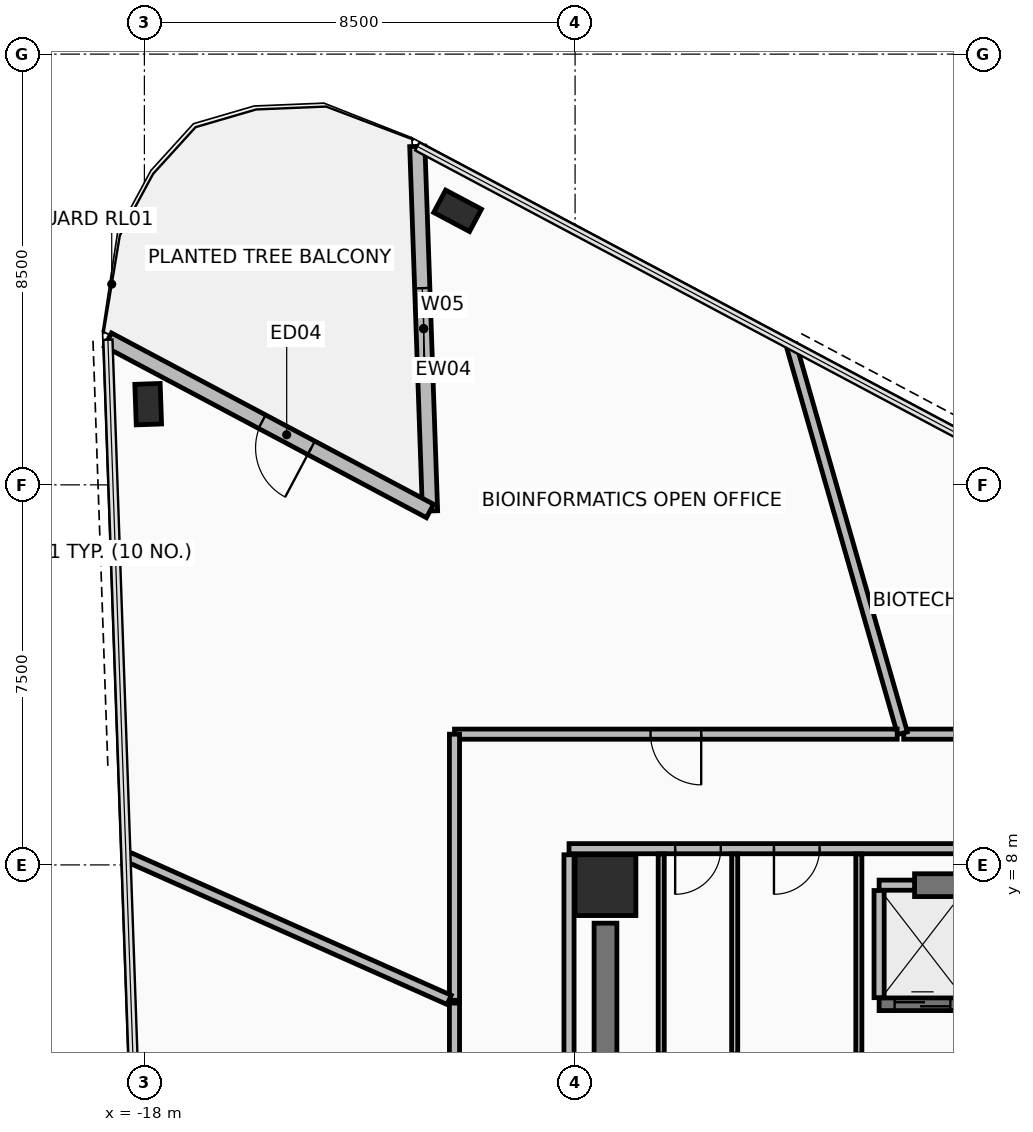
"""IFC4 building model, lengths in metres.
Left out: names, types, materials, properties, quantities, classifications, styles, units other than length and angle.
Written with IfcOpenShell. Run it as: python <this file> out.ifc"""

import sys

from ifc_helpers import new_model, si_unit, direction, frame, frame_2d, origin, origin_2d, place, context, subcontext, project, spatial, rectangle, hollow_rectangle, extrude, element, fill, save


model = new_model("IFC4")
c1 = context("Model", 3, precision=1e-05, world=origin(), true_north=direction((0.0, 1.0)))
c2 = subcontext(c1, "Body", "Model", "MODEL_VIEW")
j1 = project(units=[si_unit("LENGTHUNIT", "METRE"), si_unit("PLANEANGLEUNIT", "RADIAN")], contexts=[c1])
p1 = place(None, origin())
s1 = spatial("IfcSite", under=j1, at=p1, CompositionType="ELEMENT")
p2 = place(p1, origin())
s2 = spatial("IfcBuilding", under=s1, at=p2, CompositionType="ELEMENT")
p3 = place(p2, frame((0.0, 0.0, 142.4)))
s3 = spatial("IfcBuildingStorey", under=s2, at=p3, CompositionType="ELEMENT", Elevation=142.4)
p4 = place(p3, frame((-8.9, 7.6, 0.0), z_axis=(0.0, 0.0, 1.0), x_axis=(1.0, 0.0, 0.0)))
e1 = element("IfcColumn", 1, at=p4, inside=s3, PredefinedType="COLUMN", context=c2, shape_type="SweptSolid", body=[
    extrude(rectangle(XDim=1.2, YDim=1.2, at=origin_2d()), origin(), (0.0, 0.0, 1.0), 3.6),
])
for number, where, z_axis, x_axis in (
    (2, (-17.925, 17.092, 0.0), (0.0, 0.0, 1.0), (-0.035, 0.999, 0.0)),
    (3, (-11.819, 20.908, 0.0), (0.0, 0.0, 1.0), (-0.883, 0.469, 0.0)),
):
    element("IfcColumn", number, at=place(p3, frame(where, z_axis=z_axis, x_axis=x_axis)), inside=s3, PredefinedType="COLUMN", context=c2, shape_type="SweptSolid", body=[
        extrude(hollow_rectangle(XDim=0.5, YDim=0.8, WallThickness=0.04, at=origin_2d()), origin(), (0.0, 0.0, 1.0), 3.6),
    ])
p5 = place(p3, frame((-12.614, 22.18, 0.0), z_axis=(0.0, 0.0, 1.0), x_axis=(0.034925918675, -0.999389903994, 0.0)))
e4 = element("IfcWall", 4, at=p5, inside=s3, PredefinedType="STANDARD", context=c2, shape_type="SweptSolid", body=[
    extrude(rectangle(XDim=7.2, YDim=0.3, at=frame_2d((3.6, 0.0))), origin(), (0.0, 0.0, 1.0), 2.705),
])
p6 = place(p5, frame((2.8, 0.0, 0.325)))
e5 = element("IfcOpeningElement", 5, at=p6, cuts=e4, PredefinedType="OPENING", context=c2, shape_type="SweptSolid", body=[
    extrude(rectangle(XDim=1.6, YDim=2.2, at=frame_2d((0.8, 1.1))), frame((0.0, 0.16, 0.0), z_axis=(0.0, -1.0, 0.0), x_axis=(1.0, 0.0, 0.0)), (0.0, 0.0, 1.0), 0.32),
])
p7 = place(p3, frame((-12.363, 14.984, 0.0), z_axis=(0.0, 0.0, 1.0), x_axis=(-0.882950149473, 0.469466754463, 0.0)))
e6 = element("IfcWall", 6, at=p7, inside=s3, PredefinedType="STANDARD", context=c2, shape_type="SweptSolid", body=[
    extrude(rectangle(XDim=7.2, YDim=0.3, at=frame_2d((3.6, 0.0))), origin(), (0.0, 0.0, 1.0), 2.705),
])
p8 = place(p7, frame((2.654, 0.0, 0.0)))
e7 = element("IfcOpeningElement", 7, at=p8, cuts=e6, PredefinedType="OPENING", context=c2, shape_type="SweptSolid", body=[
    extrude(rectangle(XDim=1.1, YDim=2.2, at=frame_2d((0.55, 1.1))), frame((0.0, 0.16, 0.0), z_axis=(0.0, -1.0, 0.0), x_axis=(1.0, 0.0, 0.0)), (0.0, 0.0, 1.0), 0.32),
])
p9 = place(p3, frame((-2.8, 7.6, 0.0), z_axis=(0.0, 0.0, 1.0), x_axis=(1.0, 0.0, 0.0)))
e8 = element("IfcWall", 8, at=p9, inside=s3, PredefinedType="SHEAR", context=c2, shape_type="SweptSolid", body=[
    extrude(rectangle(XDim=5.38, YDim=0.45, at=frame_2d((2.69, 0.0))), origin(), (0.0, 0.0, 1.0), 3.41),
])
p10 = place(p3, frame((-8.9, -3.85, 0.0), z_axis=(0.0, 0.0, 1.0), x_axis=(0.0, 1.0, 0.0)))
e9 = element("IfcWall", 9, at=p10, inside=s3, PredefinedType="SHEAR", context=c2, shape_type="SweptSolid", body=[
    extrude(rectangle(XDim=10.7, YDim=0.45, at=frame_2d((5.35, 0.0))), origin(), (0.0, 0.0, 1.0), 3.41),
])
p11 = place(p3, frame((9.62, 8.32, 0.0), z_axis=(0.0, 0.0, 1.0), x_axis=(-1.0, 0.0, 0.0)))
e10 = element("IfcWall", 10, at=p11, inside=s3, PredefinedType="PARTITIONING", context=c2, shape_type="SweptSolid", body=[
    extrude(rectangle(XDim=19.24, YDim=0.2, at=frame_2d((9.62, 0.0))), origin(), (0.0, 0.0, 1.0), 2.755),
])
p12 = place(p11, frame((16.245, 0.0, 0.0)))
e11 = element("IfcOpeningElement", 11, at=p12, cuts=e10, PredefinedType="OPENING", context=c2, shape_type="SweptSolid", body=[
    extrude(rectangle(XDim=0.9, YDim=2.1, at=frame_2d((0.45, 1.05))), frame((0.0, 0.11, 0.0), z_axis=(0.0, -1.0, 0.0), x_axis=(1.0, 0.0, 0.0)), (0.0, 0.0, 1.0), 0.22),
])
p13 = place(p11, frame((14.295, 0.0, 0.0)))
e12 = element("IfcOpeningElement", 12, at=p13, cuts=e10, PredefinedType="OPENING", context=c2, shape_type="SweptSolid", body=[
    extrude(rectangle(XDim=0.9, YDim=2.1, at=frame_2d((0.45, 1.05))), frame((0.0, 0.11, 0.0), z_axis=(0.0, -1.0, 0.0), x_axis=(1.0, 0.0, 0.0)), (0.0, 0.0, 1.0), 0.22),
])
p14 = place(p3, frame((-9.62, 8.2, 0.0), z_axis=(0.0, 0.0, 1.0), x_axis=(0.0, -1.0, 0.0)))
e13 = element("IfcWall", 13, at=p14, inside=s3, PredefinedType="PARTITIONING", context=c2, shape_type="SweptSolid", body=[
    extrude(rectangle(XDim=16.4, YDim=0.2, at=frame_2d((8.2, 0.0))), origin(), (0.0, 0.0, 1.0), 2.855),
])
p15 = place(p14, frame((12.65, 0.0, 0.0)))
e14 = element("IfcOpeningElement", 14, at=p15, cuts=e13, PredefinedType="OPENING", context=c2, shape_type="SweptSolid", body=[
    extrude(rectangle(XDim=1.1, YDim=2.15, at=frame_2d((0.55, 1.075))), frame((0.0, 0.11, 0.0), z_axis=(0.0, -1.0, 0.0), x_axis=(1.0, 0.0, 0.0)), (0.0, 0.0, 1.0), 0.22),
])
p16 = place(p3, frame((-3.5, 5.25, 0.0), z_axis=(0.0, 0.0, 1.0), x_axis=(1.0, 0.0, 0.0)))
e15 = element("IfcWall", 15, at=p16, inside=s3, PredefinedType="SHEAR", context=c2, shape_type="SweptSolid", body=[
    extrude(rectangle(XDim=1.712, YDim=0.25, at=frame_2d((0.856, 0.0))), origin(), (0.0, 0.0, 1.0), 3.41),
])
p17 = place(p16, frame((0.306, 0.0, 0.0)))
e16 = element("IfcOpeningElement", 16, at=p17, cuts=e15, PredefinedType="OPENING", context=c2, shape_type="SweptSolid", body=[
    extrude(rectangle(XDim=1.1, YDim=2.2, at=frame_2d((0.55, 1.1))), frame((0.0, 0.135, 0.0), z_axis=(0.0, -1.0, 0.0), x_axis=(1.0, 0.0, 0.0)), (0.0, 0.0, 1.0), 0.27),
])
p18 = place(p3, frame((-3.5, 7.6, 0.0), z_axis=(0.0, 0.0, 1.0), x_axis=(1.0, 0.0, 0.0)))
e17 = element("IfcWall", 17, at=p18, inside=s3, PredefinedType="PARTITIONING", context=c2, shape_type="SweptSolid", body=[
    extrude(rectangle(XDim=0.7, YDim=0.2, at=frame_2d((0.35, 0.0))), origin(), (0.0, 0.0, 1.0), 2.605),
])
p19 = place(p3, frame((-3.5, 5.38, 0.0), z_axis=(0.0, 0.0, 1.0), x_axis=(0.0, 1.0, 0.0)))
e18 = element("IfcWall", 18, at=p19, inside=s3, PredefinedType="PARTITIONING", context=c2, shape_type="SweptSolid", body=[
    extrude(rectangle(XDim=2.115, YDim=0.2, at=frame_2d((1.058, 0.0))), origin(), (0.0, 0.0, 1.0), 2.605),
])
for number, where, z_axis, x_axis in (
    (19, (-6.35, 4.265, 0.0), (0.0, 0.0, 1.0), (0.0, 1.0, 0.0)),
    (20, (-7.8, 8.215, 0.0), (0.0, 0.0, 1.0), (0.0, -1.0, 0.0)),
    (21, (-3.9, 4.265, 0.0), (0.0, 0.0, 1.0), (0.0, 1.0, 0.0)),
):
    element("IfcWall", number, at=place(p3, frame(where, z_axis=z_axis, x_axis=x_axis)), inside=s3, PredefinedType="PARTITIONING", context=c2, shape_type="SweptSolid", body=[
        extrude(rectangle(XDim=3.95, YDim=0.12, at=frame_2d((1.975, 0.0))), origin(), (0.0, 0.0, 1.0), 2.605),
    ])
p20 = place(p3, frame((7.674, 10.58, 0.0), z_axis=(0.0, 0.0, 1.0), x_axis=(-1.0, 0.0, 0.0)))
e22 = element("IfcWall", 22, at=p20, inside=s3, PredefinedType="PARTITIONING", context=c2, shape_type="SweptSolid", body=[
    extrude(rectangle(XDim=10.689, YDim=0.2, at=frame_2d((5.344, 0.0))), origin(), (0.0, 0.0, 1.0), 2.705),
])
p21 = place(p20, frame((4.845, 0.0, 0.0)))
e23 = element("IfcOpeningElement", 23, at=p21, cuts=e22, PredefinedType="OPENING", context=c2, shape_type="SweptSolid", body=[
    extrude(rectangle(XDim=1.0, YDim=2.15, at=frame_2d((0.5, 1.075))), frame((0.0, 0.11, 0.0), z_axis=(0.0, -1.0, 0.0), x_axis=(1.0, 0.0, 0.0)), (0.0, 0.0, 1.0), 0.22),
])
p22 = place(p3, frame((-3.039, 10.598, 0.0), z_axis=(0.0, 0.0, 1.0), x_axis=(-0.275619537282, 0.961266805142, 0.0)))
e24 = element("IfcWall", 24, at=p22, inside=s3, PredefinedType="PARTITIONING", context=c2, shape_type="SweptSolid", body=[
    extrude(rectangle(XDim=7.967, YDim=0.2, at=frame_2d((3.983, 0.0))), origin(), (0.0, 0.0, 1.0), 2.705),
])
p23 = place(p3, frame((-3.143, 10.58, 0.0), z_axis=(0.0, 0.0, 1.0), x_axis=(-1.0, 0.0, 0.0)))
e25 = element("IfcWall", 25, at=p23, inside=s3, PredefinedType="PARTITIONING", context=c2, shape_type="SweptSolid", body=[
    extrude(rectangle(XDim=8.736, YDim=0.2, at=frame_2d((4.368, 0.0))), origin(), (0.0, 0.0, 1.0), 2.755),
])
p24 = place(p23, frame((3.868, 0.0, 0.0)))
e26 = element("IfcOpeningElement", 26, at=p24, cuts=e25, PredefinedType="OPENING", context=c2, shape_type="SweptSolid", body=[
    extrude(rectangle(XDim=1.0, YDim=2.15, at=frame_2d((0.5, 1.075))), frame((0.0, 0.11, 0.0), z_axis=(0.0, -1.0, 0.0), x_axis=(1.0, 0.0, 0.0)), (0.0, 0.0, 1.0), 0.22),
])
p25 = place(p3, frame((-11.88, 10.579, 0.0), z_axis=(0.0, 0.0, 1.0), x_axis=(0.0, -1.0, 0.0)))
e27 = element("IfcWall", 27, at=p25, inside=s3, PredefinedType="PARTITIONING", context=c2, shape_type="SweptSolid", body=[
    extrude(rectangle(XDim=5.251, YDim=0.2, at=frame_2d((2.626, 0.0))), origin(), (0.0, 0.0, 1.0), 2.855),
])
p26 = place(p3, frame((-11.985, 5.336, 0.0), z_axis=(0.0, 0.0, 1.0), x_axis=(-0.913541116326, 0.406746393693, 0.0)))
e28 = element("IfcWall", 28, at=p26, inside=s3, PredefinedType="PARTITIONING", context=c2, shape_type="SweptSolid", body=[
    extrude(rectangle(XDim=6.967, YDim=0.2, at=frame_2d((3.483, 0.0))), origin(), (0.0, 0.0, 1.0), 2.705),
])
p27 = place(p3, frame((-11.88, 5.273, 0.0), z_axis=(0.0, 0.0, 1.0), x_axis=(0.0, -1.0, 0.0)))
e29 = element("IfcWall", 29, at=p27, inside=s3, PredefinedType="PARTITIONING", context=c2, shape_type="SweptSolid", body=[
    extrude(rectangle(XDim=11.052, YDim=0.2, at=frame_2d((5.526, 0.0))), origin(), (0.0, 0.0, 1.0), 2.855),
])
p28 = place(p27, frame((4.926, 0.0, 0.0)))
e30 = element("IfcOpeningElement", 30, at=p28, cuts=e29, PredefinedType="OPENING", context=c2, shape_type="SweptSolid", body=[
    extrude(rectangle(XDim=1.2, YDim=2.15, at=frame_2d((0.6, 1.075))), frame((0.0, 0.11, 0.0), z_axis=(0.0, -1.0, 0.0), x_axis=(1.0, 0.0, 0.0)), (0.0, 0.0, 1.0), 0.22),
])
p29 = place(p8, origin())
e31 = element("IfcDoor", 31, at=p29, inside=s3, OperationType="SINGLE_SWING_LEFT", PredefinedType="DOOR", context=c2, shape_type="SweptSolid", body=[
    extrude(rectangle(XDim=1.1, YDim=2.2, at=frame_2d((0.55, 1.1))), frame((0.0, 0.025, 0.0), z_axis=(0.0, -1.0, 0.0), x_axis=(1.0, 0.0, 0.0)), (0.0, 0.0, 1.0), 0.05),
])
fill(e7, e31)
p30 = place(p6, origin())
e32 = element("IfcWindow", 32, at=p30, inside=s3, PartitioningType="SINGLE_PANEL", PredefinedType="WINDOW", context=c2, shape_type="SweptSolid", body=[
    extrude(rectangle(XDim=1.6, YDim=2.2, at=frame_2d((0.8, 1.1))), frame((0.0, 0.03, 0.0), z_axis=(0.0, -1.0, 0.0), x_axis=(1.0, 0.0, 0.0)), (0.0, 0.0, 1.0), 0.06),
])
fill(e5, e32)
p31 = place(p17, origin())
e33 = element("IfcDoor", 33, at=p31, inside=s3, OperationType="SLIDING_TO_LEFT", PredefinedType="DOOR", context=c2, shape_type="SweptSolid", body=[
    extrude(rectangle(XDim=1.1, YDim=2.2, at=frame_2d((0.55, 1.1))), frame((0.0, 0.025, 0.0), z_axis=(0.0, -1.0, 0.0), x_axis=(1.0, 0.0, 0.0)), (0.0, 0.0, 1.0), 0.05),
])
fill(e16, e33)
p32 = place(p12, frame((0.9, 0.0, 0.0), z_axis=(0.0, 0.0, 1.0), x_axis=(-1.0, 0.0, 0.0)))
e34 = element("IfcDoor", 34, at=p32, inside=s3, OperationType="SINGLE_SWING_LEFT", PredefinedType="DOOR", context=c2, shape_type="SweptSolid", body=[
    extrude(rectangle(XDim=0.9, YDim=2.1, at=frame_2d((0.45, 1.05))), frame((0.0, 0.025, 0.0), z_axis=(0.0, -1.0, 0.0), x_axis=(1.0, 0.0, 0.0)), (0.0, 0.0, 1.0), 0.05),
])
fill(e11, e34)
p33 = place(p13, frame((0.9, 0.0, 0.0), z_axis=(0.0, 0.0, 1.0), x_axis=(-1.0, 0.0, 0.0)))
e35 = element("IfcDoor", 35, at=p33, inside=s3, OperationType="SINGLE_SWING_LEFT", PredefinedType="DOOR", context=c2, shape_type="SweptSolid", body=[
    extrude(rectangle(XDim=0.9, YDim=2.1, at=frame_2d((0.45, 1.05))), frame((0.0, 0.025, 0.0), z_axis=(0.0, -1.0, 0.0), x_axis=(1.0, 0.0, 0.0)), (0.0, 0.0, 1.0), 0.05),
])
fill(e12, e35)
p34 = place(p24, origin())
e36 = element("IfcDoor", 36, at=p34, inside=s3, OperationType="SINGLE_SWING_RIGHT", PredefinedType="DOOR", context=c2, shape_type="SweptSolid", body=[
    extrude(rectangle(XDim=1.0, YDim=2.15, at=frame_2d((0.5, 1.075))), frame((0.0, 0.025, 0.0), z_axis=(0.0, -1.0, 0.0), x_axis=(1.0, 0.0, 0.0)), (0.0, 0.0, 1.0), 0.05),
])
fill(e26, e36)
save(model, sys.argv[1])
